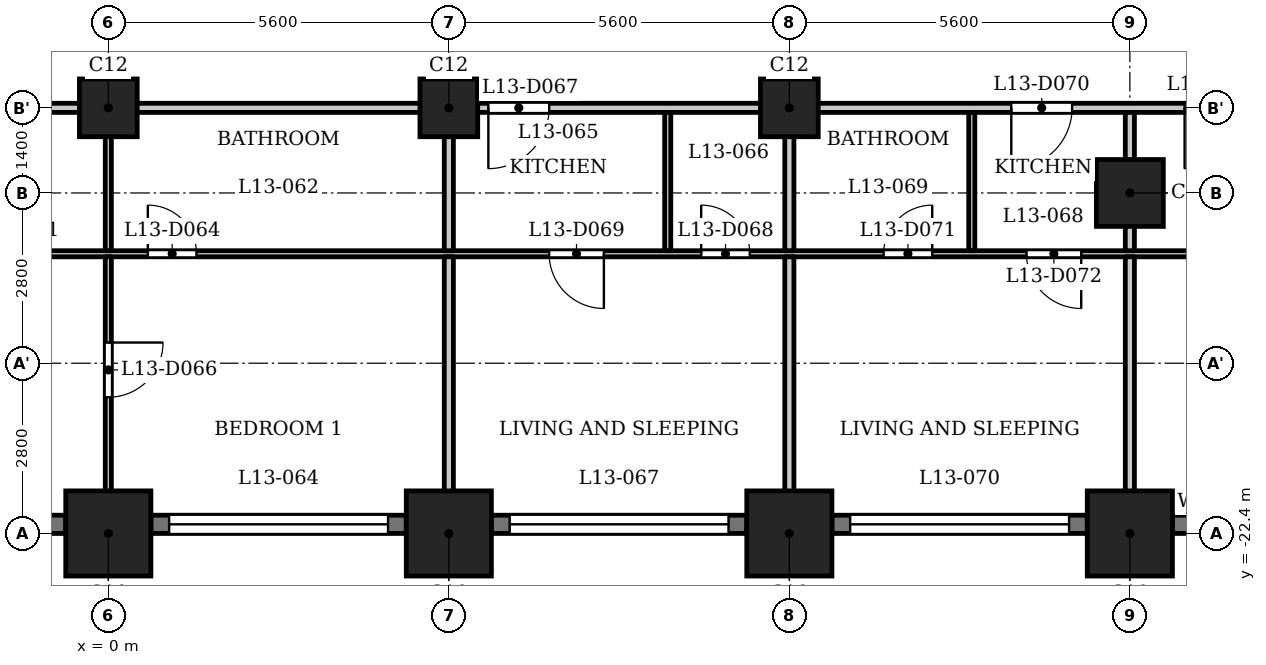
"""IFC4 building model, lengths in metres.
Left out: names, types, materials, properties, quantities, classifications, styles, units other than length and angle.
Written with IfcOpenShell. Run it as: python <this file> out.ifc"""

import sys

from ifc_helpers import new_model, si_unit, direction, frame, frame_2d, origin, origin_2d, place, context, subcontext, project, spatial, rectangle, extrude, element, fill, save


model = new_model("IFC4")
c1 = context("Model", 3, precision=1e-05, world=origin(), true_north=direction((0.0, 1.0)))
c2 = subcontext(c1, "Body", "Model", "MODEL_VIEW")
j1 = project(units=[si_unit("LENGTHUNIT", "METRE"), si_unit("PLANEANGLEUNIT", "RADIAN")], contexts=[c1])
p1 = place(None, origin())
s1 = spatial("IfcSite", under=j1, at=p1, CompositionType="ELEMENT")
p2 = place(p1, origin())
s2 = spatial("IfcBuilding", under=s1, at=p2, CompositionType="ELEMENT")
p3 = place(p2, frame((0.0, 0.0, 55.0)))
s3 = spatial("IfcBuildingStorey", under=s2, at=p3, CompositionType="ELEMENT", Elevation=55.0)
for number, where, z_axis, x_axis in (
    (1, (0.0, -22.4, 0.0), (0.0, 0.0, 1.0), (1.0, 0.0, 0.0)),
    (2, (5.6, -22.4, 0.0), (0.0, 0.0, 1.0), (1.0, 0.0, 0.0)),
    (3, (11.2, -22.4, 0.0), (0.0, 0.0, 1.0), (1.0, 0.0, 0.0)),
    (4, (16.8, -22.4, 0.0), (0.0, 0.0, 1.0), (1.0, 0.0, 0.0)),
):
    element("IfcColumn", number, at=place(p3, frame(where, z_axis=z_axis, x_axis=x_axis)), inside=s3, PredefinedType="COLUMN", context=c2, shape_type="SweptSolid", body=[
        extrude(rectangle(XDim=1.4, YDim=1.4, at=origin_2d()), origin(), (0.0, 0.0, 1.0), 3.5),
    ])
p4 = place(p3, frame((16.8, -16.8, 0.0), z_axis=(0.0, 0.0, 1.0), x_axis=(1.0, 0.0, 0.0)))
e5 = element("IfcColumn", 5, at=p4, inside=s3, PredefinedType="COLUMN", context=c2, shape_type="SweptSolid", body=[
    extrude(rectangle(XDim=1.1, YDim=1.1, at=origin_2d()), origin(), (0.0, 0.0, 1.0), 3.5),
])
for number, where, z_axis, x_axis in (
    (6, (0.0, -15.4, 0.0), (0.0, 0.0, 1.0), (1.0, 0.0, 0.0)),
    (7, (5.6, -15.4, 0.0), (0.0, 0.0, 1.0), (1.0, 0.0, 0.0)),
    (8, (11.2, -15.4, 0.0), (0.0, 0.0, 1.0), (1.0, 0.0, 0.0)),
):
    element("IfcColumn", number, at=place(p3, frame(where, z_axis=z_axis, x_axis=x_axis)), inside=s3, PredefinedType="COLUMN", context=c2, shape_type="SweptSolid", body=[
        extrude(rectangle(XDim=0.95, YDim=0.95, at=origin_2d()), origin(), (0.0, 0.0, 1.0), 3.5),
    ])
p5 = place(p3, frame((-4.9, -22.25, 0.0), z_axis=(0.0, 0.0, 1.0), x_axis=(1.0, 0.0, 0.0)))
e9 = element("IfcWall", 9, at=p5, inside=s3, PredefinedType="SOLIDWALL", context=c2, shape_type="SweptSolid", body=[
    extrude(rectangle(XDim=4.2, YDim=0.3, at=frame_2d((2.1, 0.0))), origin(), (0.0, 0.0, 1.0), 2.35),
])
p6 = place(p5, frame((0.3, 0.0, 1.2)))
e10 = element("IfcOpeningElement", 10, at=p6, cuts=e9, PredefinedType="OPENING", context=c2, shape_type="SweptSolid", body=[
    extrude(rectangle(XDim=3.6, YDim=0.95, at=frame_2d((1.8, 0.475))), frame((0.0, 0.16, 0.0), z_axis=(0.0, -1.0, 0.0), x_axis=(1.0, 0.0, 0.0)), (0.0, 0.0, 1.0), 0.32),
])
p7 = place(p3, frame((0.7, -22.25, 0.0), z_axis=(0.0, 0.0, 1.0), x_axis=(1.0, 0.0, 0.0)))
e11 = element("IfcWall", 11, at=p7, inside=s3, PredefinedType="SOLIDWALL", context=c2, shape_type="SweptSolid", body=[
    extrude(rectangle(XDim=4.2, YDim=0.3, at=frame_2d((2.1, 0.0))), origin(), (0.0, 0.0, 1.0), 2.35),
])
p8 = place(p7, frame((0.3, 0.0, 1.2)))
e12 = element("IfcOpeningElement", 12, at=p8, cuts=e11, PredefinedType="OPENING", context=c2, shape_type="SweptSolid", body=[
    extrude(rectangle(XDim=3.6, YDim=0.95, at=frame_2d((1.8, 0.475))), frame((0.0, 0.16, 0.0), z_axis=(0.0, -1.0, 0.0), x_axis=(1.0, 0.0, 0.0)), (0.0, 0.0, 1.0), 0.32),
])
p9 = place(p3, frame((6.3, -22.25, 0.0), z_axis=(0.0, 0.0, 1.0), x_axis=(1.0, 0.0, 0.0)))
e13 = element("IfcWall", 13, at=p9, inside=s3, PredefinedType="SOLIDWALL", context=c2, shape_type="SweptSolid", body=[
    extrude(rectangle(XDim=4.2, YDim=0.3, at=frame_2d((2.1, 0.0))), origin(), (0.0, 0.0, 1.0), 2.35),
])
p10 = place(p9, frame((0.3, 0.0, 1.2)))
e14 = element("IfcOpeningElement", 14, at=p10, cuts=e13, PredefinedType="OPENING", context=c2, shape_type="SweptSolid", body=[
    extrude(rectangle(XDim=3.6, YDim=0.95, at=frame_2d((1.8, 0.475))), frame((0.0, 0.16, 0.0), z_axis=(0.0, -1.0, 0.0), x_axis=(1.0, 0.0, 0.0)), (0.0, 0.0, 1.0), 0.32),
])
p11 = place(p3, frame((11.9, -22.25, 0.0), z_axis=(0.0, 0.0, 1.0), x_axis=(1.0, 0.0, 0.0)))
e15 = element("IfcWall", 15, at=p11, inside=s3, PredefinedType="SOLIDWALL", context=c2, shape_type="SweptSolid", body=[
    extrude(rectangle(XDim=4.2, YDim=0.3, at=frame_2d((2.1, 0.0))), origin(), (0.0, 0.0, 1.0), 2.35),
])
p12 = place(p11, frame((0.3, 0.0, 1.2)))
e16 = element("IfcOpeningElement", 16, at=p12, cuts=e15, PredefinedType="OPENING", context=c2, shape_type="SweptSolid", body=[
    extrude(rectangle(XDim=3.6, YDim=0.95, at=frame_2d((1.8, 0.475))), frame((0.0, 0.16, 0.0), z_axis=(0.0, -1.0, 0.0), x_axis=(1.0, 0.0, 0.0)), (0.0, 0.0, 1.0), 0.32),
])
p13 = place(p3, frame((17.5, -22.25, 0.0), z_axis=(0.0, 0.0, 1.0), x_axis=(1.0, 0.0, 0.0)))
e17 = element("IfcWall", 17, at=p13, inside=s3, PredefinedType="SOLIDWALL", context=c2, shape_type="SweptSolid", body=[
    extrude(rectangle(XDim=2.5, YDim=0.3, at=frame_2d((1.25, 0.0))), origin(), (0.0, 0.0, 1.0), 2.35),
])
p14 = place(p13, frame((0.35, 0.0, 0.9)))
e18 = element("IfcOpeningElement", 18, at=p14, cuts=e17, PredefinedType="OPENING", context=c2, shape_type="SweptSolid", body=[
    extrude(rectangle(XDim=1.8, YDim=1.25, at=frame_2d((0.9, 0.625))), frame((0.0, 0.16, 0.0), z_axis=(0.0, -1.0, 0.0), x_axis=(1.0, 0.0, 0.0)), (0.0, 0.0, 1.0), 0.32),
])
p15 = place(p3, frame((-26.394, -17.8, 0.0), z_axis=(0.0, 0.0, 1.0), x_axis=(1.0, 0.0, 0.0)))
e19 = element("IfcWall", 19, at=p15, inside=s3, PredefinedType="PARTITIONING", context=c2, shape_type="SweptSolid", body=[
    extrude(rectangle(XDim=53.034, YDim=0.1, at=frame_2d((26.517, 0.0))), origin(), (0.0, 0.0, 1.0), 3.2),
])
p16 = place(p15, frame((0.794, 0.0, 0.0)))
e20 = element("IfcOpeningElement", 20, at=p16, cuts=e19, PredefinedType="OPENING", context=c2, shape_type="SweptSolid", body=[
    extrude(rectangle(XDim=0.8, YDim=2.1, at=frame_2d((0.4, 1.05))), frame((0.0, 0.06, 0.0), z_axis=(0.0, -1.0, 0.0), x_axis=(1.0, 0.0, 0.0)), (0.0, 0.0, 1.0), 0.12),
])
p17 = place(p15, frame((5.644, 0.0, 0.0)))
e21 = element("IfcOpeningElement", 21, at=p17, cuts=e19, PredefinedType="OPENING", context=c2, shape_type="SweptSolid", body=[
    extrude(rectangle(XDim=0.9, YDim=2.1, at=frame_2d((0.45, 1.05))), frame((0.0, 0.06, 0.0), z_axis=(0.0, -1.0, 0.0), x_axis=(1.0, 0.0, 0.0)), (0.0, 0.0, 1.0), 0.12),
])
p18 = place(p15, frame((19.344, 0.0, 0.0)))
e22 = element("IfcOpeningElement", 22, at=p18, cuts=e19, PredefinedType="OPENING", context=c2, shape_type="SweptSolid", body=[
    extrude(rectangle(XDim=0.8, YDim=2.1, at=frame_2d((0.4, 1.05))), frame((0.0, 0.06, 0.0), z_axis=(0.0, -1.0, 0.0), x_axis=(1.0, 0.0, 0.0)), (0.0, 0.0, 1.0), 0.12),
])
p19 = place(p15, frame((17.094, 0.0, 0.0)))
e23 = element("IfcOpeningElement", 23, at=p19, cuts=e19, PredefinedType="OPENING", context=c2, shape_type="SweptSolid", body=[
    extrude(rectangle(XDim=0.9, YDim=2.1, at=frame_2d((0.45, 1.05))), frame((0.0, 0.06, 0.0), z_axis=(0.0, -1.0, 0.0), x_axis=(1.0, 0.0, 0.0)), (0.0, 0.0, 1.0), 0.12),
])
p20 = place(p15, frame((10.494, 0.0, 0.0)))
e24 = element("IfcOpeningElement", 24, at=p20, cuts=e19, PredefinedType="OPENING", context=c2, shape_type="SweptSolid", body=[
    extrude(rectangle(XDim=0.9, YDim=2.1, at=frame_2d((0.45, 1.05))), frame((0.0, 0.06, 0.0), z_axis=(0.0, -1.0, 0.0), x_axis=(1.0, 0.0, 0.0)), (0.0, 0.0, 1.0), 0.12),
])
p21 = place(p15, frame((13.294, 0.0, 0.0)))
e25 = element("IfcOpeningElement", 25, at=p21, cuts=e19, PredefinedType="OPENING", context=c2, shape_type="SweptSolid", body=[
    extrude(rectangle(XDim=0.9, YDim=2.1, at=frame_2d((0.45, 1.05))), frame((0.0, 0.06, 0.0), z_axis=(0.0, -1.0, 0.0), x_axis=(1.0, 0.0, 0.0)), (0.0, 0.0, 1.0), 0.12),
])
p22 = place(p15, frame((27.044, 0.0, 0.0)))
e26 = element("IfcOpeningElement", 26, at=p22, cuts=e19, PredefinedType="OPENING", context=c2, shape_type="SweptSolid", body=[
    extrude(rectangle(XDim=0.8, YDim=2.1, at=frame_2d((0.4, 1.05))), frame((0.0, 0.06, 0.0), z_axis=(0.0, -1.0, 0.0), x_axis=(1.0, 0.0, 0.0)), (0.0, 0.0, 1.0), 0.12),
])
p23 = place(p15, frame((22.444, 0.0, 0.0)))
e27 = element("IfcOpeningElement", 27, at=p23, cuts=e19, PredefinedType="OPENING", context=c2, shape_type="SweptSolid", body=[
    extrude(rectangle(XDim=0.9, YDim=2.1, at=frame_2d((0.45, 1.05))), frame((0.0, 0.06, 0.0), z_axis=(0.0, -1.0, 0.0), x_axis=(1.0, 0.0, 0.0)), (0.0, 0.0, 1.0), 0.12),
])
p24 = place(p15, frame((36.144, 0.0, 0.0)))
e28 = element("IfcOpeningElement", 28, at=p24, cuts=e19, PredefinedType="OPENING", context=c2, shape_type="SweptSolid", body=[
    extrude(rectangle(XDim=0.8, YDim=2.1, at=frame_2d((0.4, 1.05))), frame((0.0, 0.06, 0.0), z_axis=(0.0, -1.0, 0.0), x_axis=(1.0, 0.0, 0.0)), (0.0, 0.0, 1.0), 0.12),
])
p25 = place(p15, frame((33.644, 0.0, 0.0)))
e29 = element("IfcOpeningElement", 29, at=p25, cuts=e19, PredefinedType="OPENING", context=c2, shape_type="SweptSolid", body=[
    extrude(rectangle(XDim=0.9, YDim=2.1, at=frame_2d((0.45, 1.05))), frame((0.0, 0.06, 0.0), z_axis=(0.0, -1.0, 0.0), x_axis=(1.0, 0.0, 0.0)), (0.0, 0.0, 1.0), 0.12),
])
p26 = place(p15, frame((39.144, 0.0, 0.0)))
e30 = element("IfcOpeningElement", 30, at=p26, cuts=e19, PredefinedType="OPENING", context=c2, shape_type="SweptSolid", body=[
    extrude(rectangle(XDim=0.8, YDim=2.1, at=frame_2d((0.4, 1.05))), frame((0.0, 0.06, 0.0), z_axis=(0.0, -1.0, 0.0), x_axis=(1.0, 0.0, 0.0)), (0.0, 0.0, 1.0), 0.12),
])
p27 = place(p15, frame((41.494, 0.0, 0.0)))
e31 = element("IfcOpeningElement", 31, at=p27, cuts=e19, PredefinedType="OPENING", context=c2, shape_type="SweptSolid", body=[
    extrude(rectangle(XDim=0.9, YDim=2.1, at=frame_2d((0.45, 1.05))), frame((0.0, 0.06, 0.0), z_axis=(0.0, -1.0, 0.0), x_axis=(1.0, 0.0, 0.0)), (0.0, 0.0, 1.0), 0.12),
])
p28 = place(p15, frame((49.362, 0.0, 0.0)))
e32 = element("IfcOpeningElement", 32, at=p28, cuts=e19, PredefinedType="OPENING", context=c2, shape_type="SweptSolid", body=[
    extrude(rectangle(XDim=0.8, YDim=2.1, at=frame_2d((0.4, 1.05))), frame((0.0, 0.06, 0.0), z_axis=(0.0, -1.0, 0.0), x_axis=(1.0, 0.0, 0.0)), (0.0, 0.0, 1.0), 0.12),
])
p29 = place(p15, frame((45.094, 0.0, 0.0)))
e33 = element("IfcOpeningElement", 33, at=p29, cuts=e19, PredefinedType="OPENING", context=c2, shape_type="SweptSolid", body=[
    extrude(rectangle(XDim=0.9, YDim=2.1, at=frame_2d((0.45, 1.05))), frame((0.0, 0.06, 0.0), z_axis=(0.0, -1.0, 0.0), x_axis=(1.0, 0.0, 0.0)), (0.0, 0.0, 1.0), 0.12),
])
p30 = place(p3, frame((-27.484, -15.4, 0.0), z_axis=(0.0, 0.0, 1.0), x_axis=(1.0, 0.0, 0.0)))
e34 = element("IfcWall", 34, at=p30, inside=s3, PredefinedType="PARTITIONING", context=c2, shape_type="SweptSolid", body=[
    extrude(rectangle(XDim=54.968, YDim=0.15, at=frame_2d((27.484, 0.0))), origin(), (0.0, 0.0, 1.0), 3.2),
])
p31 = place(p30, frame((5.734, 0.0, 0.0)))
e35 = element("IfcOpeningElement", 35, at=p31, cuts=e34, PredefinedType="OPENING", context=c2, shape_type="SweptSolid", body=[
    extrude(rectangle(XDim=1.0, YDim=2.1, at=frame_2d((0.5, 1.05))), frame((0.0, 0.085, 0.0), z_axis=(0.0, -1.0, 0.0), x_axis=(1.0, 0.0, 0.0)), (0.0, 0.0, 1.0), 0.17),
])
p32 = place(p30, frame((11.584, 0.0, 0.0)))
e36 = element("IfcOpeningElement", 36, at=p32, cuts=e34, PredefinedType="OPENING", context=c2, shape_type="SweptSolid", body=[
    extrude(rectangle(XDim=1.0, YDim=2.1, at=frame_2d((0.5, 1.05))), frame((0.0, 0.085, 0.0), z_axis=(0.0, -1.0, 0.0), x_axis=(1.0, 0.0, 0.0)), (0.0, 0.0, 1.0), 0.17),
])
p33 = place(p30, frame((22.534, 0.0, 0.0)))
e37 = element("IfcOpeningElement", 37, at=p33, cuts=e34, PredefinedType="OPENING", context=c2, shape_type="SweptSolid", body=[
    extrude(rectangle(XDim=1.0, YDim=2.1, at=frame_2d((0.5, 1.05))), frame((0.0, 0.085, 0.0), z_axis=(0.0, -1.0, 0.0), x_axis=(1.0, 0.0, 0.0)), (0.0, 0.0, 1.0), 0.17),
])
p34 = place(p30, frame((33.734, 0.0, 0.0)))
e38 = element("IfcOpeningElement", 38, at=p34, cuts=e34, PredefinedType="OPENING", context=c2, shape_type="SweptSolid", body=[
    extrude(rectangle(XDim=1.0, YDim=2.1, at=frame_2d((0.5, 1.05))), frame((0.0, 0.085, 0.0), z_axis=(0.0, -1.0, 0.0), x_axis=(1.0, 0.0, 0.0)), (0.0, 0.0, 1.0), 0.17),
])
p35 = place(p30, frame((42.334, 0.0, 0.0)))
e39 = element("IfcOpeningElement", 39, at=p35, cuts=e34, PredefinedType="OPENING", context=c2, shape_type="SweptSolid", body=[
    extrude(rectangle(XDim=1.0, YDim=2.1, at=frame_2d((0.5, 1.05))), frame((0.0, 0.085, 0.0), z_axis=(0.0, -1.0, 0.0), x_axis=(1.0, 0.0, 0.0)), (0.0, 0.0, 1.0), 0.17),
])
p36 = place(p30, frame((45.184, 0.0, 0.0)))
e40 = element("IfcOpeningElement", 40, at=p36, cuts=e34, PredefinedType="OPENING", context=c2, shape_type="SweptSolid", body=[
    extrude(rectangle(XDim=1.0, YDim=2.1, at=frame_2d((0.5, 1.05))), frame((0.0, 0.085, 0.0), z_axis=(0.0, -1.0, 0.0), x_axis=(1.0, 0.0, 0.0)), (0.0, 0.0, 1.0), 0.17),
])
p37 = place(p3, frame((0.0, -23.08, 0.0), z_axis=(0.0, 0.0, 1.0), x_axis=(0.0, 1.0, 0.0)))
e41 = element("IfcWall", 41, at=p37, inside=s3, PredefinedType="PARTITIONING", context=c2, shape_type="SweptSolid", body=[
    extrude(rectangle(XDim=5.23, YDim=0.1, at=frame_2d((2.615, 0.0))), origin(), (0.0, 0.0, 1.0), 3.2),
])
p38 = place(p37, frame((2.92, 0.0, 0.0)))
e42 = element("IfcOpeningElement", 42, at=p38, cuts=e41, PredefinedType="OPENING", context=c2, shape_type="SweptSolid", body=[
    extrude(rectangle(XDim=0.9, YDim=2.1, at=frame_2d((0.45, 1.05))), frame((0.0, 0.06, 0.0), z_axis=(0.0, -1.0, 0.0), x_axis=(1.0, 0.0, 0.0)), (0.0, 0.0, 1.0), 0.12),
])
p39 = place(p3, frame((0.0, -17.75, 0.0), z_axis=(0.0, 0.0, 1.0), x_axis=(0.0, 1.0, 0.0)))
e43 = element("IfcWall", 43, at=p39, inside=s3, PredefinedType="PARTITIONING", context=c2, shape_type="SweptSolid", body=[
    extrude(rectangle(XDim=2.275, YDim=0.1, at=frame_2d((1.137, 0.0))), origin(), (0.0, 0.0, 1.0), 3.2),
])
p40 = place(p3, frame((5.6, -23.08, 0.0), z_axis=(0.0, 0.0, 1.0), x_axis=(0.0, 1.0, 0.0)))
e44 = element("IfcWall", 44, at=p40, inside=s3, PredefinedType="PARTITIONING", context=c2, shape_type="SweptSolid", body=[
    extrude(rectangle(XDim=5.23, YDim=0.15, at=frame_2d((2.615, 0.0))), origin(), (0.0, 0.0, 1.0), 3.2),
])
p41 = place(p3, frame((5.6, -17.75, 0.0), z_axis=(0.0, 0.0, 1.0), x_axis=(0.0, 1.0, 0.0)))
e45 = element("IfcWall", 45, at=p41, inside=s3, PredefinedType="PARTITIONING", context=c2, shape_type="SweptSolid", body=[
    extrude(rectangle(XDim=2.275, YDim=0.15, at=frame_2d((1.137, 0.0))), origin(), (0.0, 0.0, 1.0), 3.2),
])
p42 = place(p3, frame((9.2, -17.75, 0.0), z_axis=(0.0, 0.0, 1.0), x_axis=(0.0, 1.0, 0.0)))
e46 = element("IfcWall", 46, at=p42, inside=s3, PredefinedType="PARTITIONING", context=c2, shape_type="SweptSolid", body=[
    extrude(rectangle(XDim=2.275, YDim=0.1, at=frame_2d((1.137, 0.0))), origin(), (0.0, 0.0, 1.0), 3.2),
])
p43 = place(p3, frame((11.2, -23.08, 0.0), z_axis=(0.0, 0.0, 1.0), x_axis=(0.0, 1.0, 0.0)))
e47 = element("IfcWall", 47, at=p43, inside=s3, PredefinedType="PARTITIONING", context=c2, shape_type="SweptSolid", body=[
    extrude(rectangle(XDim=5.23, YDim=0.15, at=frame_2d((2.615, 0.0))), origin(), (0.0, 0.0, 1.0), 3.2),
])
p44 = place(p3, frame((11.2, -17.75, 0.0), z_axis=(0.0, 0.0, 1.0), x_axis=(0.0, 1.0, 0.0)))
e48 = element("IfcWall", 48, at=p44, inside=s3, PredefinedType="PARTITIONING", context=c2, shape_type="SweptSolid", body=[
    extrude(rectangle(XDim=2.275, YDim=0.15, at=frame_2d((1.137, 0.0))), origin(), (0.0, 0.0, 1.0), 3.2),
])
p45 = place(p3, frame((14.2, -17.75, 0.0), z_axis=(0.0, 0.0, 1.0), x_axis=(0.0, 1.0, 0.0)))
e49 = element("IfcWall", 49, at=p45, inside=s3, PredefinedType="PARTITIONING", context=c2, shape_type="SweptSolid", body=[
    extrude(rectangle(XDim=2.275, YDim=0.1, at=frame_2d((1.137, 0.0))), origin(), (0.0, 0.0, 1.0), 3.2),
])
p46 = place(p3, frame((16.8, -23.08, 0.0), z_axis=(0.0, 0.0, 1.0), x_axis=(0.0, 1.0, 0.0)))
e50 = element("IfcWall", 50, at=p46, inside=s3, PredefinedType="PARTITIONING", context=c2, shape_type="SweptSolid", body=[
    extrude(rectangle(XDim=5.23, YDim=0.15, at=frame_2d((2.615, 0.0))), origin(), (0.0, 0.0, 1.0), 3.2),
])
p47 = place(p3, frame((16.8, -17.75, 0.0), z_axis=(0.0, 0.0, 1.0), x_axis=(0.0, 1.0, 0.0)))
e51 = element("IfcWall", 51, at=p47, inside=s3, PredefinedType="PARTITIONING", context=c2, shape_type="SweptSolid", body=[
    extrude(rectangle(XDim=2.275, YDim=0.15, at=frame_2d((1.137, 0.0))), origin(), (0.0, 0.0, 1.0), 3.2),
])
p48 = place(p22, origin())
e52 = element("IfcDoor", 52, at=p48, inside=s3, OperationType="SINGLE_SWING_RIGHT", PredefinedType="DOOR", context=c2, shape_type="SweptSolid", body=[
    extrude(rectangle(XDim=0.8, YDim=2.1, at=frame_2d((0.4, 1.05))), frame((0.0, 0.025, 0.0), z_axis=(0.0, -1.0, 0.0), x_axis=(1.0, 0.0, 0.0)), (0.0, 0.0, 1.0), 0.05),
])
fill(e26, e52)
p49 = place(p38, origin())
e53 = element("IfcDoor", 53, at=p49, inside=s3, OperationType="SINGLE_SWING_RIGHT", PredefinedType="DOOR", context=c2, shape_type="SweptSolid", body=[
    extrude(rectangle(XDim=0.9, YDim=2.1, at=frame_2d((0.45, 1.05))), frame((0.0, 0.025, 0.0), z_axis=(0.0, -1.0, 0.0), x_axis=(1.0, 0.0, 0.0)), (0.0, 0.0, 1.0), 0.05),
])
fill(e42, e53)
p50 = place(p34, origin())
e54 = element("IfcDoor", 54, at=p50, inside=s3, OperationType="SINGLE_SWING_LEFT", PredefinedType="DOOR", context=c2, shape_type="SweptSolid", body=[
    extrude(rectangle(XDim=1.0, YDim=2.1, at=frame_2d((0.5, 1.05))), frame((0.0, 0.025, 0.0), z_axis=(0.0, -1.0, 0.0), x_axis=(1.0, 0.0, 0.0)), (0.0, 0.0, 1.0), 0.05),
])
fill(e38, e54)
p51 = place(p24, origin())
e55 = element("IfcDoor", 55, at=p51, inside=s3, OperationType="SINGLE_SWING_RIGHT", PredefinedType="DOOR", context=c2, shape_type="SweptSolid", body=[
    extrude(rectangle(XDim=0.8, YDim=2.1, at=frame_2d((0.4, 1.05))), frame((0.0, 0.025, 0.0), z_axis=(0.0, -1.0, 0.0), x_axis=(1.0, 0.0, 0.0)), (0.0, 0.0, 1.0), 0.05),
])
fill(e28, e55)
p52 = place(p25, origin())
e56 = element("IfcDoor", 56, at=p52, inside=s3, OperationType="SINGLE_SWING_RIGHT", PredefinedType="DOOR", context=c2, shape_type="SweptSolid", body=[
    extrude(rectangle(XDim=0.9, YDim=2.1, at=frame_2d((0.45, 1.05))), frame((0.0, 0.025, 0.0), z_axis=(0.0, -1.0, 0.0), x_axis=(1.0, 0.0, 0.0)), (0.0, 0.0, 1.0), 0.05),
])
fill(e29, e56)
p53 = place(p35, origin())
e57 = element("IfcDoor", 57, at=p53, inside=s3, OperationType="SINGLE_SWING_LEFT", PredefinedType="DOOR", context=c2, shape_type="SweptSolid", body=[
    extrude(rectangle(XDim=1.0, YDim=2.1, at=frame_2d((0.5, 1.05))), frame((0.0, 0.025, 0.0), z_axis=(0.0, -1.0, 0.0), x_axis=(1.0, 0.0, 0.0)), (0.0, 0.0, 1.0), 0.05),
])
fill(e39, e57)
p54 = place(p26, origin())
e58 = element("IfcDoor", 58, at=p54, inside=s3, OperationType="SINGLE_SWING_LEFT", PredefinedType="DOOR", context=c2, shape_type="SweptSolid", body=[
    extrude(rectangle(XDim=0.8, YDim=2.1, at=frame_2d((0.4, 1.05))), frame((0.0, 0.025, 0.0), z_axis=(0.0, -1.0, 0.0), x_axis=(1.0, 0.0, 0.0)), (0.0, 0.0, 1.0), 0.05),
])
fill(e30, e58)
p55 = place(p27, origin())
e59 = element("IfcDoor", 59, at=p55, inside=s3, OperationType="SINGLE_SWING_RIGHT", PredefinedType="DOOR", context=c2, shape_type="SweptSolid", body=[
    extrude(rectangle(XDim=0.9, YDim=2.1, at=frame_2d((0.45, 1.05))), frame((0.0, 0.025, 0.0), z_axis=(0.0, -1.0, 0.0), x_axis=(1.0, 0.0, 0.0)), (0.0, 0.0, 1.0), 0.05),
])
fill(e31, e59)
p56 = place(p36, origin())
e60 = element("IfcDoor", 60, at=p56, inside=s3, OperationType="SINGLE_SWING_LEFT", PredefinedType="DOOR", context=c2, shape_type="SweptSolid", body=[
    extrude(rectangle(XDim=1.0, YDim=2.1, at=frame_2d((0.5, 1.05))), frame((0.0, 0.025, 0.0), z_axis=(0.0, -1.0, 0.0), x_axis=(1.0, 0.0, 0.0)), (0.0, 0.0, 1.0), 0.05),
])
fill(e40, e60)
p57 = place(p8, origin())
e61 = element("IfcWindow", 61, at=p57, inside=s3, PartitioningType="SINGLE_PANEL", PredefinedType="WINDOW", context=c2, shape_type="SweptSolid", body=[
    extrude(rectangle(XDim=3.6, YDim=0.95, at=frame_2d((1.8, 0.475))), frame((0.0, 0.03, 0.0), z_axis=(0.0, -1.0, 0.0), x_axis=(1.0, 0.0, 0.0)), (0.0, 0.0, 1.0), 0.06),
])
fill(e12, e61)
p58 = place(p10, origin())
e62 = element("IfcWindow", 62, at=p58, inside=s3, PartitioningType="SINGLE_PANEL", PredefinedType="WINDOW", context=c2, shape_type="SweptSolid", body=[
    extrude(rectangle(XDim=3.6, YDim=0.95, at=frame_2d((1.8, 0.475))), frame((0.0, 0.03, 0.0), z_axis=(0.0, -1.0, 0.0), x_axis=(1.0, 0.0, 0.0)), (0.0, 0.0, 1.0), 0.06),
])
fill(e14, e62)
p59 = place(p12, origin())
e63 = element("IfcWindow", 63, at=p59, inside=s3, PartitioningType="SINGLE_PANEL", PredefinedType="WINDOW", context=c2, shape_type="SweptSolid", body=[
    extrude(rectangle(XDim=3.6, YDim=0.95, at=frame_2d((1.8, 0.475))), frame((0.0, 0.03, 0.0), z_axis=(0.0, -1.0, 0.0), x_axis=(1.0, 0.0, 0.0)), (0.0, 0.0, 1.0), 0.06),
])
fill(e16, e63)
save(model, sys.argv[1])
